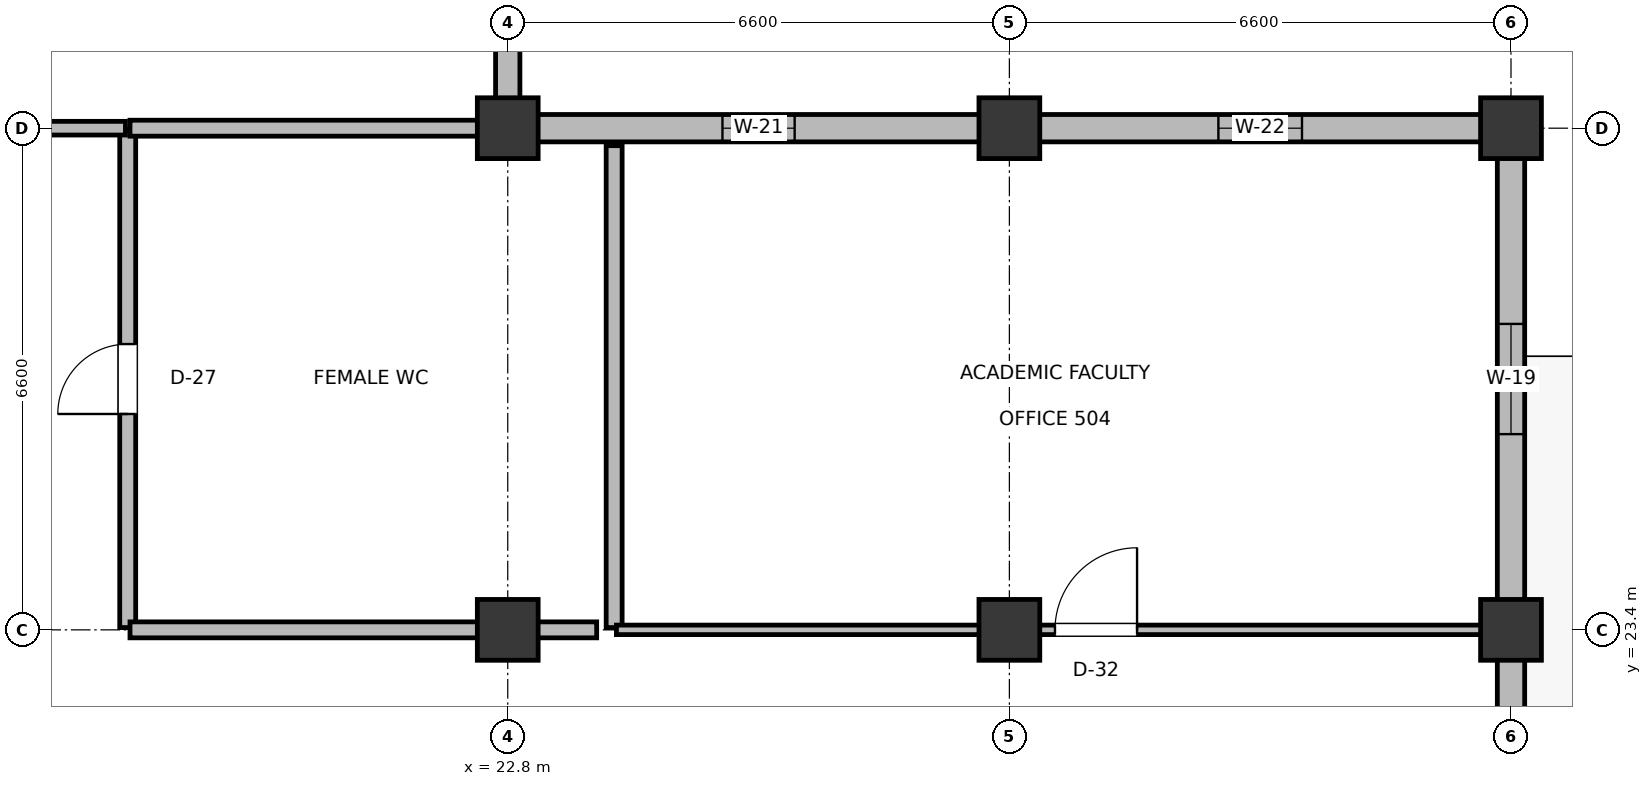
"""IFC4 building model, lengths in metres.
Left out: names, types, materials, properties, quantities, classifications, styles, units other than length and angle.
Written with IfcOpenShell. Run it as: python <this file> out.ifc"""

import sys

from ifc_helpers import new_model, si_unit, direction, frame, frame_2d, origin, origin_2d, place, context, subcontext, project, spatial, rectangle, extrude, element, fill, save


model = new_model("IFC4")
c1 = context("Model", 3, precision=1e-05, world=origin(), true_north=direction((0.0, 1.0)))
c2 = subcontext(c1, "Body", "Model", "MODEL_VIEW")
j1 = project(units=[si_unit("LENGTHUNIT", "METRE"), si_unit("PLANEANGLEUNIT", "RADIAN")], contexts=[c1])
p1 = place(None, origin())
s1 = spatial("IfcSite", under=j1, at=p1, CompositionType="ELEMENT")
p2 = place(p1, origin())
s2 = spatial("IfcBuilding", under=s1, at=p2, CompositionType="ELEMENT")
p3 = place(p2, frame((0.0, 0.0, 24.0)))
s3 = spatial("IfcBuildingStorey", under=s2, at=p3, CompositionType="ELEMENT", Elevation=24.0)
for number, where, z_axis, x_axis in (
    (1, (22.8, 23.4, 0.0), (0.0, 0.0, 1.0), (1.0, 0.0, 0.0)),
    (2, (22.8, 30.0, 0.0), (0.0, 0.0, 1.0), (1.0, 0.0, 0.0)),
    (3, (29.4, 23.4, 0.0), (0.0, 0.0, 1.0), (1.0, 0.0, 0.0)),
    (4, (29.4, 30.0, 0.0), (0.0, 0.0, 1.0), (1.0, 0.0, 0.0)),
    (5, (36.0, 23.4, 0.0), (0.0, 0.0, 1.0), (1.0, 0.0, 0.0)),
    (6, (36.0, 30.0, 0.0), (0.0, 0.0, 1.0), (1.0, 0.0, 0.0)),
):
    element("IfcColumn", number, at=place(p3, frame(where, z_axis=z_axis, x_axis=x_axis)), inside=s3, PredefinedType="COLUMN", context=c2, shape_type="SweptSolid", body=[
        extrude(rectangle(XDim=0.8, YDim=0.8, at=origin_2d()), origin(), (0.0, 0.0, 1.0), 4.5),
    ])
p4 = place(p3, frame((36.0, 9.385, 0.0), z_axis=(0.0, 0.0, 1.0), x_axis=(0.0, 1.0, 0.0)))
e7 = element("IfcWall", 7, at=p4, inside=s3, PredefinedType="SOLIDWALL", context=c2, shape_type="SweptSolid", body=[
    extrude(rectangle(XDim=13.63, YDim=0.36, at=frame_2d((6.815, 0.0))), origin(), (0.0, 0.0, 1.0), 3.375),
])
p5 = place(p4, frame((5.99, 0.0, 0.9)))
e8 = element("IfcOpeningElement", 8, at=p5, cuts=e7, PredefinedType="OPENING", context=c2, shape_type="SweptSolid", body=[
    extrude(rectangle(XDim=1.65, YDim=1.65, at=frame_2d((0.825, 0.825))), frame((0.0, 0.19, 0.0), z_axis=(0.0, -1.0, 0.0), x_axis=(1.0, 0.0, 0.0)), (0.0, 0.0, 1.0), 0.38),
])
p6 = place(p3, frame((36.0, 23.785, 0.0), z_axis=(0.0, 0.0, 1.0), x_axis=(0.0, 1.0, 0.0)))
e9 = element("IfcWall", 9, at=p6, inside=s3, PredefinedType="SOLIDWALL", context=c2, shape_type="SweptSolid", body=[
    extrude(rectangle(XDim=5.83, YDim=0.36, at=frame_2d((2.915, 0.0))), origin(), (0.0, 0.0, 1.0), 3.575),
])
p7 = place(p6, frame((2.19, 0.0, 0.9)))
e10 = element("IfcOpeningElement", 10, at=p7, cuts=e9, PredefinedType="OPENING", context=c2, shape_type="SweptSolid", body=[
    extrude(rectangle(XDim=1.45, YDim=1.5, at=frame_2d((0.725, 0.75))), frame((0.0, 0.19, 0.0), z_axis=(0.0, -1.0, 0.0), x_axis=(1.0, 0.0, 0.0)), (0.0, 0.0, 1.0), 0.38),
])
p8 = place(p3, frame((23.185, 30.0, 0.0), z_axis=(0.0, 0.0, 1.0), x_axis=(1.0, 0.0, 0.0)))
e11 = element("IfcWall", 11, at=p8, inside=s3, PredefinedType="SOLIDWALL", context=c2, shape_type="SweptSolid", body=[
    extrude(rectangle(XDim=5.83, YDim=0.36, at=frame_2d((2.915, 0.0))), origin(), (0.0, 0.0, 1.0), 3.655),
])
p9 = place(p8, frame((2.44, 0.0, 0.9)))
e12 = element("IfcOpeningElement", 12, at=p9, cuts=e11, PredefinedType="OPENING", context=c2, shape_type="SweptSolid", body=[
    extrude(rectangle(XDim=0.95, YDim=1.7, at=frame_2d((0.475, 0.85))), frame((0.0, 0.19, 0.0), z_axis=(0.0, -1.0, 0.0), x_axis=(1.0, 0.0, 0.0)), (0.0, 0.0, 1.0), 0.38),
])
p10 = place(p3, frame((29.785, 30.0, 0.0), z_axis=(0.0, 0.0, 1.0), x_axis=(1.0, 0.0, 0.0)))
e13 = element("IfcWall", 13, at=p10, inside=s3, PredefinedType="SOLIDWALL", context=c2, shape_type="SweptSolid", body=[
    extrude(rectangle(XDim=5.83, YDim=0.36, at=frame_2d((2.915, 0.0))), origin(), (0.0, 0.0, 1.0), 3.475),
])
p11 = place(p10, frame((2.365, 0.0, 0.9)))
e14 = element("IfcOpeningElement", 14, at=p11, cuts=e13, PredefinedType="OPENING", context=c2, shape_type="SweptSolid", body=[
    extrude(rectangle(XDim=1.1, YDim=1.75, at=frame_2d((0.55, 0.875))), frame((0.0, 0.19, 0.0), z_axis=(0.0, -1.0, 0.0), x_axis=(1.0, 0.0, 0.0)), (0.0, 0.0, 1.0), 0.38),
])
p12 = place(p3, frame((22.8, 30.385, 0.0), z_axis=(0.0, 0.0, 1.0), x_axis=(0.0, 1.0, 0.0)))
e15 = element("IfcWall", 15, at=p12, inside=s3, PredefinedType="SOLIDWALL", context=c2, shape_type="SweptSolid", body=[
    extrude(rectangle(XDim=8.28, YDim=0.32, at=frame_2d((4.14, 0.0))), origin(), (0.0, 0.0, 1.0), 3.595),
])
p13 = place(p12, frame((3.565, 0.0, 0.9)))
e16 = element("IfcOpeningElement", 16, at=p13, cuts=e15, PredefinedType="OPENING", context=c2, shape_type="SweptSolid", body=[
    extrude(rectangle(XDim=1.15, YDim=1.15, at=frame_2d((0.575, 0.575))), frame((0.0, 0.17, 0.0), z_axis=(0.0, -1.0, 0.0), x_axis=(1.0, 0.0, 0.0)), (0.0, 0.0, 1.0), 0.34),
])
p14 = place(p3, frame((24.2, 23.43, 0.0), z_axis=(0.0, 0.0, 1.0), x_axis=(0.0, 1.0, 0.0)))
e17 = element("IfcWall", 17, at=p14, inside=s3, PredefinedType="PLUMBINGWALL", context=c2, shape_type="SweptSolid", body=[
    extrude(rectangle(XDim=6.34, YDim=0.21, at=frame_2d((3.17, 0.0))), origin(), (0.0, 0.0, 1.0), 3.525),
])
p15 = place(p3, frame((17.8, 23.43, 0.0), z_axis=(0.0, 0.0, 1.0), x_axis=(0.0, 1.0, 0.0)))
e18 = element("IfcWall", 18, at=p15, inside=s3, PredefinedType="PLUMBINGWALL", context=c2, shape_type="SweptSolid", body=[
    extrude(rectangle(XDim=6.54, YDim=0.21, at=frame_2d((3.27, 0.0))), origin(), (0.0, 0.0, 1.0), 3.395),
])
p16 = place(p15, frame((2.81, 0.0, 0.0)))
e19 = element("IfcOpeningElement", 19, at=p16, cuts=e18, PredefinedType="OPENING", context=c2, shape_type="SweptSolid", body=[
    extrude(rectangle(XDim=0.92, YDim=2.1, at=frame_2d((0.46, 1.05))), frame((0.0, 0.115, 0.0), z_axis=(0.0, -1.0, 0.0), x_axis=(1.0, 0.0, 0.0)), (0.0, 0.0, 1.0), 0.23),
])
p17 = place(p3, frame((17.83, 23.4, 0.0), z_axis=(0.0, 0.0, 1.0), x_axis=(1.0, 0.0, 0.0)))
e20 = element("IfcWall", 20, at=p17, inside=s3, PredefinedType="PLUMBINGWALL", context=c2, shape_type="SweptSolid", body=[
    extrude(rectangle(XDim=6.14, YDim=0.21, at=frame_2d((3.07, 0.0))), origin(), (0.0, 0.0, 1.0), 3.395),
])
p18 = place(p3, frame((17.83, 30.0, 0.0), z_axis=(0.0, 0.0, 1.0), x_axis=(1.0, 0.0, 0.0)))
e21 = element("IfcWall", 21, at=p18, inside=s3, PredefinedType="PLUMBINGWALL", context=c2, shape_type="SweptSolid", body=[
    extrude(rectangle(XDim=4.74, YDim=0.21, at=frame_2d((2.37, 0.0))), origin(), (0.0, 0.0, 1.0), 3.495),
])
p19 = place(p3, frame((24.23, 23.4, 0.0), z_axis=(0.0, 0.0, 1.0), x_axis=(1.0, 0.0, 0.0)))
e22 = element("IfcWall", 22, at=p19, inside=s3, PredefinedType="PARTITIONING", context=c2, shape_type="SweptSolid", body=[
    extrude(rectangle(XDim=11.54, YDim=0.125, at=frame_2d((5.77, 0.0))), origin(), (0.0, 0.0, 1.0), 3.305),
])
p20 = place(p19, frame((5.77, 0.0, 0.0)))
e23 = element("IfcOpeningElement", 23, at=p20, cuts=e22, PredefinedType="OPENING", context=c2, shape_type="SweptSolid", body=[
    extrude(rectangle(XDim=1.08, YDim=2.15, at=frame_2d((0.54, 1.075))), frame((0.0, 0.073, 0.0), z_axis=(0.0, -1.0, 0.0), x_axis=(1.0, 0.0, 0.0)), (0.0, 0.0, 1.0), 0.145),
])
p21 = place(p3, frame((13.43, 30.0, 0.0), z_axis=(0.0, 0.0, 1.0), x_axis=(1.0, 0.0, 0.0)))
e24 = element("IfcWall", 24, at=p21, inside=s3, PredefinedType="PARTITIONING", context=c2, shape_type="SweptSolid", body=[
    extrude(rectangle(XDim=4.34, YDim=0.18, at=frame_2d((2.17, 0.0))), origin(), (0.0, 0.0, 1.0), 3.495),
])
p22 = place(p21, frame((1.105, 0.0, 0.0)))
e25 = element("IfcOpeningElement", 25, at=p22, cuts=e24, PredefinedType="OPENING", context=c2, shape_type="SweptSolid", body=[
    extrude(rectangle(XDim=1.05, YDim=2.2, at=frame_2d((0.525, 1.1))), frame((0.0, 0.1, 0.0), z_axis=(0.0, -1.0, 0.0), x_axis=(1.0, 0.0, 0.0)), (0.0, 0.0, 1.0), 0.2),
])
p23 = place(p7, frame((1.45, 0.0, 0.0), z_axis=(0.0, 0.0, 1.0), x_axis=(-1.0, 0.0, 0.0)))
e26 = element("IfcWindow", 26, at=p23, inside=s3, PartitioningType="SINGLE_PANEL", PredefinedType="WINDOW", context=c2, shape_type="SweptSolid", body=[
    extrude(rectangle(XDim=1.45, YDim=1.5, at=frame_2d((0.725, 0.75))), frame((0.0, 0.03, 0.0), z_axis=(0.0, -1.0, 0.0), x_axis=(1.0, 0.0, 0.0)), (0.0, 0.0, 1.0), 0.06),
])
fill(e10, e26)
p24 = place(p9, origin())
e27 = element("IfcWindow", 27, at=p24, inside=s3, PartitioningType="DOUBLE_PANEL_VERTICAL", PredefinedType="WINDOW", context=c2, shape_type="SweptSolid", body=[
    extrude(rectangle(XDim=0.95, YDim=1.7, at=frame_2d((0.475, 0.85))), frame((0.0, 0.03, 0.0), z_axis=(0.0, -1.0, 0.0), x_axis=(1.0, 0.0, 0.0)), (0.0, 0.0, 1.0), 0.06),
])
fill(e12, e27)
p25 = place(p11, origin())
e28 = element("IfcWindow", 28, at=p25, inside=s3, PartitioningType="DOUBLE_PANEL_VERTICAL", PredefinedType="WINDOW", context=c2, shape_type="SweptSolid", body=[
    extrude(rectangle(XDim=1.1, YDim=1.75, at=frame_2d((0.55, 0.875))), frame((0.0, 0.03, 0.0), z_axis=(0.0, -1.0, 0.0), x_axis=(1.0, 0.0, 0.0)), (0.0, 0.0, 1.0), 0.06),
])
fill(e14, e28)
p26 = place(p16, origin())
e29 = element("IfcDoor", 29, at=p26, inside=s3, OperationType="SINGLE_SWING_LEFT", PredefinedType="DOOR", context=c2, shape_type="SweptSolid", body=[
    extrude(rectangle(XDim=0.92, YDim=2.1, at=frame_2d((0.46, 1.05))), frame((0.0, 0.025, 0.0), z_axis=(0.0, -1.0, 0.0), x_axis=(1.0, 0.0, 0.0)), (0.0, 0.0, 1.0), 0.05),
])
fill(e19, e29)
p27 = place(p20, origin())
e30 = element("IfcDoor", 30, at=p27, inside=s3, OperationType="SINGLE_SWING_RIGHT", PredefinedType="DOOR", context=c2, shape_type="SweptSolid", body=[
    extrude(rectangle(XDim=1.08, YDim=2.15, at=frame_2d((0.54, 1.075))), frame((0.0, 0.025, 0.0), z_axis=(0.0, -1.0, 0.0), x_axis=(1.0, 0.0, 0.0)), (0.0, 0.0, 1.0), 0.05),
])
fill(e23, e30)
save(model, sys.argv[1])
